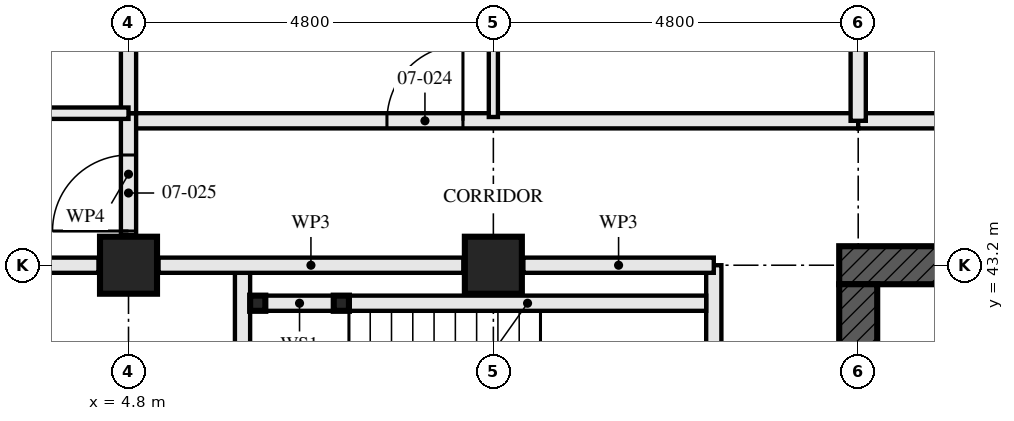
"""IFC4 building model, lengths in metres.
Left out: names, types, materials, properties, quantities, classifications, styles, units other than length and angle.
Written with IfcOpenShell. Run it as: python <this file> out.ifc"""

import sys

from ifc_helpers import new_model, si_unit, direction, frame, frame_2d, origin, origin_2d, place, context, subcontext, project, spatial, rectangle, hollow_rectangle, extrude, element, fill, save


model = new_model("IFC4")
c1 = context("Model", 3, precision=1e-05, world=origin(), true_north=direction((0.0, 1.0)))
c2 = subcontext(c1, "Body", "Model", "MODEL_VIEW")
j1 = project(units=[si_unit("LENGTHUNIT", "METRE"), si_unit("PLANEANGLEUNIT", "RADIAN")], contexts=[c1])
p1 = place(None, origin())
s1 = spatial("IfcSite", under=j1, at=p1, CompositionType="ELEMENT")
p2 = place(p1, origin())
s2 = spatial("IfcBuilding", under=s1, at=p2, CompositionType="ELEMENT")
p3 = place(p2, frame((0.0, 0.0, 30.5)))
s3 = spatial("IfcBuildingStorey", under=s2, at=p3, CompositionType="ELEMENT", Elevation=30.5)
for number, where, z_axis, x_axis in (
    (1, (4.8, 43.2, 0.0), (0.0, 0.0, 1.0), (0.0, 1.0, 0.0)),
    (2, (9.6, 43.2, 0.0), (0.0, 0.0, 1.0), (0.0, 1.0, 0.0)),
):
    element("IfcColumn", number, at=place(p3, frame(where, z_axis=z_axis, x_axis=x_axis)), inside=s3, PredefinedType="COLUMN", context=c2, shape_type="SweptSolid", body=[
        extrude(hollow_rectangle(XDim=0.75, YDim=0.75, WallThickness=0.08, at=origin_2d()), origin(), (0.0, 0.0, 1.0), 3.5),
    ])
p4 = place(p3, frame((29.05, 43.2, -0.17), z_axis=(0.0, 0.0, 1.0), x_axis=(-1.0, 0.0, 0.0)))
e3 = element("IfcWall", 3, at=p4, inside=s3, PredefinedType="SHEAR", context=c2, shape_type="SweptSolid", body=[
    extrude(rectangle(XDim=14.9, YDim=0.5, at=frame_2d((7.45, 0.0))), origin(), (0.0, 0.0, 1.0), 3.5),
])
p5 = place(p4, frame((6.85, 0.0, 0.17)))
e4 = element("IfcOpeningElement", 4, at=p5, cuts=e3, PredefinedType="OPENING", context=c2, shape_type="SweptSolid", body=[
    extrude(rectangle(XDim=1.2, YDim=2.1, at=frame_2d((0.6, 1.05))), frame((0.0, 0.26, 0.0), z_axis=(0.0, -1.0, 0.0), x_axis=(1.0, 0.0, 0.0)), (0.0, 0.0, 1.0), 0.521),
])
p6 = place(p3, frame((14.4, 42.95, -0.17), z_axis=(0.0, 0.0, 1.0), x_axis=(0.0, -1.0, 0.0)))
e5 = element("IfcWall", 5, at=p6, inside=s3, PredefinedType="SHEAR", context=c2, shape_type="SweptSolid", body=[
    extrude(rectangle(XDim=13.9, YDim=0.5, at=frame_2d((6.95, 0.0))), origin(), (0.0, 0.0, 1.0), 3.5),
])
p7 = place(p6, frame((6.35, 0.0, 0.17)))
e6 = element("IfcOpeningElement", 6, at=p7, cuts=e5, PredefinedType="OPENING", context=c2, shape_type="SweptSolid", body=[
    extrude(rectangle(XDim=1.2, YDim=2.1, at=frame_2d((0.6, 1.05))), frame((0.0, 0.26, 0.0), z_axis=(0.0, -1.0, 0.0), x_axis=(1.0, 0.0, 0.0)), (0.0, 0.0, 1.0), 0.521),
])
for number, where, z_axis, x_axis in (
    (7, (6.5, 42.7, 0.0), (0.0, 0.0, 1.0), (1.0, 0.0, 0.0)),
    (8, (7.6, 42.7, 0.0), (0.0, 0.0, 1.0), (1.0, 0.0, 0.0)),
):
    element("IfcColumn", number, at=place(p3, frame(where, z_axis=z_axis, x_axis=x_axis)), inside=s3, PredefinedType="COLUMN", context=c2, shape_type="SweptSolid", body=[
        extrude(hollow_rectangle(XDim=0.2, YDim=0.2, WallThickness=0.008, at=origin_2d()), origin(), (0.0, 0.0, 1.0), 3.33),
    ])
p8 = place(p3, frame((6.6, 42.7, 0.0), z_axis=(0.0, 0.0, 1.0), x_axis=(1.0, 0.0, 0.0)))
e9 = element("IfcWall", 9, at=p8, inside=s3, PredefinedType="SOLIDWALL", context=c2, shape_type="SweptSolid", body=[
    extrude(rectangle(XDim=0.9, YDim=0.2, at=frame_2d((0.45, 0.0))), origin(), (0.0, 0.0, 1.0), 2.99),
])
p9 = place(p3, frame((7.7, 42.7, 0.0), z_axis=(0.0, 0.0, 1.0), x_axis=(1.0, 0.0, 0.0)))
e10 = element("IfcWall", 10, at=p9, inside=s3, PredefinedType="SOLIDWALL", context=c2, shape_type="SweptSolid", body=[
    extrude(rectangle(XDim=4.7, YDim=0.2, at=frame_2d((2.35, 0.0))), origin(), (0.0, 0.0, 1.0), 2.99),
])
p10 = place(p3, frame((6.3, 43.1, 0.0), z_axis=(0.0, 0.0, 1.0), x_axis=(0.0, -1.0, 0.0)))
e11 = element("IfcWall", 11, at=p10, inside=s3, PredefinedType="SOLIDWALL", context=c2, shape_type="SweptSolid", body=[
    extrude(rectangle(XDim=3.3, YDim=0.2, at=frame_2d((1.65, 0.0))), origin(), (0.0, 0.0, 1.0), 3.33),
])
p11 = place(p3, frame((12.5, 43.2, 0.0), z_axis=(0.0, 0.0, 1.0), x_axis=(0.0, -1.0, 0.0)))
e12 = element("IfcWall", 12, at=p11, inside=s3, PredefinedType="PARTITIONING", context=c2, shape_type="SweptSolid", body=[
    extrude(rectangle(XDim=14.4, YDim=0.2, at=frame_2d((7.2, 0.0))), origin(), (0.0, 0.0, 1.0), 2.55),
])
p12 = place(p11, frame((1.4, 0.0, 0.0)))
e13 = element("IfcOpeningElement", 13, at=p12, cuts=e12, PredefinedType="OPENING", context=c2, shape_type="SweptSolid", body=[
    extrude(rectangle(XDim=1.0, YDim=2.1, at=frame_2d((0.5, 1.05))), frame((0.0, 0.111, 0.0), z_axis=(0.0, -1.0, 0.0), x_axis=(1.0, 0.0, 0.0)), (0.0, 0.0, 1.0), 0.221),
])
p13 = place(p11, frame((5.2, 0.0, 0.0)))
e14 = element("IfcOpeningElement", 14, at=p13, cuts=e12, PredefinedType="OPENING", context=c2, shape_type="SweptSolid", body=[
    extrude(rectangle(XDim=1.0, YDim=2.1, at=frame_2d((0.5, 1.05))), frame((0.0, 0.111, 0.0), z_axis=(0.0, -1.0, 0.0), x_axis=(1.0, 0.0, 0.0)), (0.0, 0.0, 1.0), 0.221),
])
p14 = place(p11, frame((10.0, 0.0, 0.0)))
e15 = element("IfcOpeningElement", 15, at=p14, cuts=e12, PredefinedType="OPENING", context=c2, shape_type="SweptSolid", body=[
    extrude(rectangle(XDim=1.0, YDim=2.1, at=frame_2d((0.5, 1.05))), frame((0.0, 0.111, 0.0), z_axis=(0.0, -1.0, 0.0), x_axis=(1.0, 0.0, 0.0)), (0.0, 0.0, 1.0), 0.221),
])
p15 = place(p3, frame((9.6, 51.9, 0.0), z_axis=(0.0, 0.0, 1.0), x_axis=(0.0, -1.0, 0.0)))
e16 = element("IfcWall", 16, at=p15, inside=s3, PredefinedType="PARTITIONING", context=c2, shape_type="SweptSolid", body=[
    extrude(rectangle(XDim=6.75, YDim=0.12, at=frame_2d((3.375, 0.0))), origin(), (0.0, 0.0, 1.0), 2.55),
])
p16 = place(p15, frame((2.925, 0.0, 0.0)))
e17 = element("IfcOpeningElement", 17, at=p16, cuts=e16, PredefinedType="OPENING", context=c2, shape_type="SweptSolid", body=[
    extrude(rectangle(XDim=0.9, YDim=2.1, at=frame_2d((0.45, 1.05))), frame((0.0, 0.071, 0.0), z_axis=(0.0, -1.0, 0.0), x_axis=(1.0, 0.0, 0.0)), (0.0, 0.0, 1.0), 0.141),
])
p17 = place(p3, frame((4.8, 52.48, 0.0), z_axis=(0.0, 0.0, 1.0), x_axis=(0.0, -1.0, 0.0)))
e18 = element("IfcWall", 18, at=p17, inside=s3, PredefinedType="PARTITIONING", context=c2, shape_type="SweptSolid", body=[
    extrude(rectangle(XDim=7.28, YDim=0.2, at=frame_2d((3.64, 0.0))), origin(), (0.0, 0.0, 1.0), 2.55),
])
p18 = place(p3, frame((4.8, 45.2, 0.0), z_axis=(0.0, 0.0, 1.0), x_axis=(-1.0, 0.0, 0.0)))
e19 = element("IfcWall", 19, at=p18, inside=s3, PredefinedType="PARTITIONING", context=c2, shape_type="SweptSolid", body=[
    extrude(rectangle(XDim=2.8, YDim=0.15, at=frame_2d((1.4, 0.0))), origin(), (0.0, 0.0, 1.0), 3.33),
])
p19 = place(p3, frame((14.4, 45.1, 0.0), z_axis=(0.0, 0.0, 1.0), x_axis=(-1.0, 0.0, 0.0)))
e20 = element("IfcWall", 20, at=p19, inside=s3, PredefinedType="PARTITIONING", context=c2, shape_type="SweptSolid", body=[
    extrude(rectangle(XDim=9.6, YDim=0.2, at=frame_2d((4.8, 0.0))), origin(), (0.0, 0.0, 1.0), 3.33),
])
p20 = place(p19, frame((5.2, 0.0, 0.0)))
e21 = element("IfcOpeningElement", 21, at=p20, cuts=e20, PredefinedType="OPENING", context=c2, shape_type="SweptSolid", body=[
    extrude(rectangle(XDim=1.0, YDim=2.1, at=frame_2d((0.5, 1.05))), frame((0.0, 0.111, 0.0), z_axis=(0.0, -1.0, 0.0), x_axis=(1.0, 0.0, 0.0)), (0.0, 0.0, 1.0), 0.221),
])
p21 = place(p3, frame((4.8, 45.2, 0.0), z_axis=(0.0, 0.0, 1.0), x_axis=(0.0, -1.0, 0.0)))
e22 = element("IfcWall", 22, at=p21, inside=s3, PredefinedType="PARTITIONING", context=c2, shape_type="SweptSolid", body=[
    extrude(rectangle(XDim=1.605, YDim=0.2, at=frame_2d((0.802, 0.0))), origin(), (0.0, 0.0, 1.0), 3.33),
])
p22 = place(p21, frame((0.55, 0.0, 0.0)))
e23 = element("IfcOpeningElement", 23, at=p22, cuts=e22, PredefinedType="OPENING", context=c2, shape_type="SweptSolid", body=[
    extrude(rectangle(XDim=1.0, YDim=2.1, at=frame_2d((0.5, 1.05))), frame((0.0, 0.111, 0.0), z_axis=(0.0, -1.0, 0.0), x_axis=(1.0, 0.0, 0.0)), (0.0, 0.0, 1.0), 0.221),
])
p23 = place(p3, frame((28.8, 45.1, 0.0), z_axis=(0.0, 0.0, 1.0), x_axis=(-1.0, 0.0, 0.0)))
e24 = element("IfcWall", 24, at=p23, inside=s3, PredefinedType="PARTITIONING", context=c2, shape_type="SweptSolid", body=[
    extrude(rectangle(XDim=14.4, YDim=0.2, at=frame_2d((7.2, 0.0))), origin(), (0.0, 0.0, 1.0), 3.33),
])
p24 = place(p23, frame((5.2, 0.0, 0.0)))
e25 = element("IfcOpeningElement", 25, at=p24, cuts=e24, PredefinedType="OPENING", context=c2, shape_type="SweptSolid", body=[
    extrude(rectangle(XDim=1.0, YDim=2.1, at=frame_2d((0.5, 1.05))), frame((0.0, 0.111, 0.0), z_axis=(0.0, -1.0, 0.0), x_axis=(1.0, 0.0, 0.0)), (0.0, 0.0, 1.0), 0.221),
])
p25 = place(p23, frame((10.0, 0.0, 0.0)))
e26 = element("IfcOpeningElement", 26, at=p25, cuts=e24, PredefinedType="OPENING", context=c2, shape_type="SweptSolid", body=[
    extrude(rectangle(XDim=1.0, YDim=2.1, at=frame_2d((0.5, 1.05))), frame((0.0, 0.111, 0.0), z_axis=(0.0, -1.0, 0.0), x_axis=(1.0, 0.0, 0.0)), (0.0, 0.0, 1.0), 0.221),
])
p26 = place(p3, frame((12.5, 43.2, 0.0), z_axis=(0.0, 0.0, 1.0), x_axis=(-1.0, 0.0, 0.0)))
e27 = element("IfcWall", 27, at=p26, inside=s3, PredefinedType="PARTITIONING", context=c2, shape_type="SweptSolid", body=[
    extrude(rectangle(XDim=2.505, YDim=0.2, at=frame_2d((1.252, 0.0))), origin(), (0.0, 0.0, 1.0), 2.32),
])
p27 = place(p3, frame((9.205, 43.2, 0.0), z_axis=(0.0, 0.0, 1.0), x_axis=(-1.0, 0.0, 0.0)))
e28 = element("IfcWall", 28, at=p27, inside=s3, PredefinedType="PARTITIONING", context=c2, shape_type="SweptSolid", body=[
    extrude(rectangle(XDim=4.01, YDim=0.2, at=frame_2d((2.005, 0.0))), origin(), (0.0, 0.0, 1.0), 2.32),
])
p28 = place(p3, frame((4.405, 43.2, 0.0), z_axis=(0.0, 0.0, 1.0), x_axis=(-1.0, 0.0, 0.0)))
e29 = element("IfcWall", 29, at=p28, inside=s3, PredefinedType="PARTITIONING", context=c2, shape_type="SweptSolid", body=[
    extrude(rectangle(XDim=4.085, YDim=0.2, at=frame_2d((2.042, 0.0))), origin(), (0.0, 0.0, 1.0), 2.32),
])
p29 = place(p3, frame((14.4, 45.1, 0.0), z_axis=(0.0, 0.0, 1.0), x_axis=(0.0, 1.0, 0.0)))
e30 = element("IfcWall", 30, at=p29, inside=s3, PredefinedType="PARTITIONING", context=c2, shape_type="SweptSolid", body=[
    extrude(rectangle(XDim=2.53, YDim=0.2, at=frame_2d((1.265, 0.0))), origin(), (0.0, 0.0, 1.0), 2.32),
])
p30 = place(p20, frame((1.0, 0.0, 0.0), z_axis=(0.0, 0.0, 1.0), x_axis=(-1.0, 0.0, 0.0)))
e31 = element("IfcDoor", 31, at=p30, inside=s3, OperationType="SINGLE_SWING_LEFT", PredefinedType="DOOR", context=c2, shape_type="SweptSolid", body=[
    extrude(rectangle(XDim=1.0, YDim=2.1, at=frame_2d((0.5, 1.05))), frame((0.0, 0.027, 0.0), z_axis=(0.0, -1.0, 0.0), x_axis=(1.0, 0.0, 0.0)), (0.0, 0.0, 1.0), 0.054),
])
fill(e21, e31)
p31 = place(p22, frame((1.0, 0.0, 0.0), z_axis=(0.0, 0.0, 1.0), x_axis=(-1.0, 0.0, 0.0)))
e32 = element("IfcDoor", 32, at=p31, inside=s3, OperationType="SINGLE_SWING_RIGHT", PredefinedType="DOOR", context=c2, shape_type="SweptSolid", body=[
    extrude(rectangle(XDim=1.0, YDim=2.1, at=frame_2d((0.5, 1.05))), frame((0.0, 0.027, 0.0), z_axis=(0.0, -1.0, 0.0), x_axis=(1.0, 0.0, 0.0)), (0.0, 0.0, 1.0), 0.054),
])
fill(e23, e32)
save(model, sys.argv[1])
